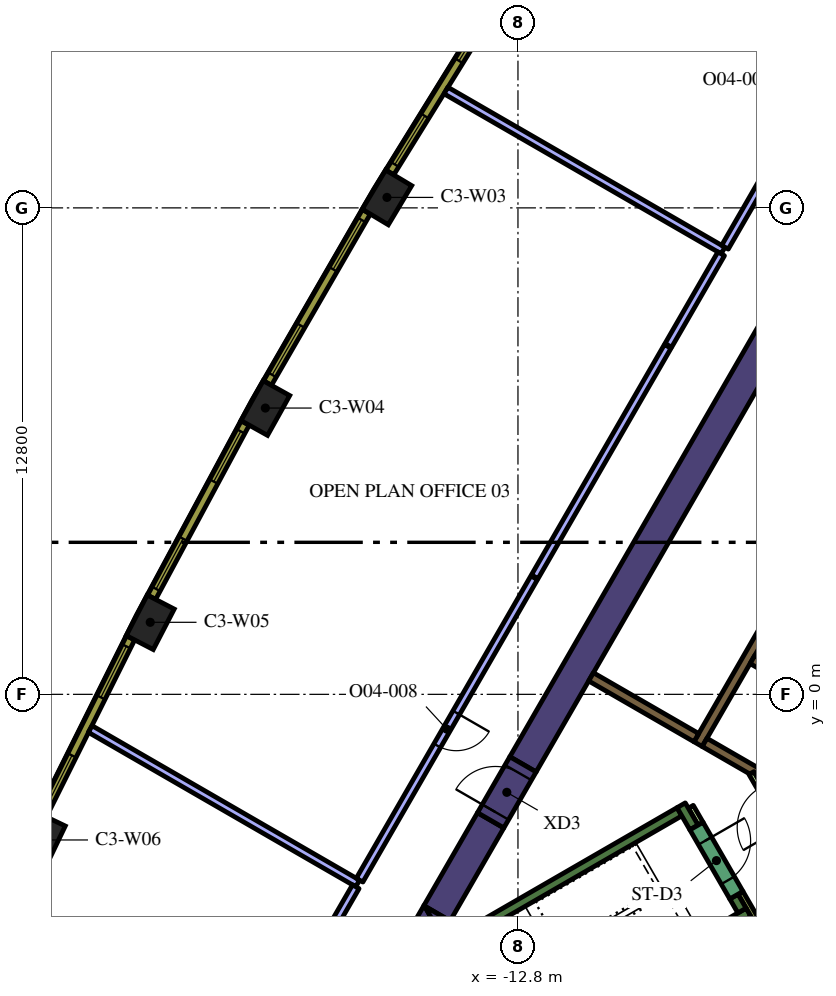
"""IFC4 building model, lengths in metres.
Left out: names, types, materials, properties, quantities, classifications, styles, units other than length and angle.
Written with IfcOpenShell. Run it as: python <this file> out.ifc"""

import sys

from ifc_helpers import new_model, si_unit, direction, frame, frame_2d, origin, origin_2d, place, context, subcontext, project, spatial, polyline, rectangle, outline, extrude, element, fill, save


model = new_model("IFC4")
c1 = context("Model", 3, precision=1e-05, world=origin(), true_north=direction((0.0, 1.0)))
c2 = subcontext(c1, "Body", "Model", "MODEL_VIEW")
j1 = project(units=[si_unit("LENGTHUNIT", "METRE"), si_unit("PLANEANGLEUNIT", "RADIAN")], contexts=[c1])
p1 = place(None, origin())
s1 = spatial("IfcSite", under=j1, at=p1, CompositionType="ELEMENT")
p2 = place(p1, origin())
s2 = spatial("IfcBuilding", under=s1, at=p2, CompositionType="ELEMENT")
p3 = place(p2, frame((0.0, 0.0, 183.6)))
s3 = spatial("IfcBuildingStorey", under=s2, at=p3, CompositionType="ELEMENT", Elevation=183.6)
for number, where, z_axis, x_axis in (
    (1, (-16.247, 13.075, 0.0), (0.0, 0.0, 1.0), (-0.513, -0.858, 0.0)),
    (2, (-19.447, 7.533, 0.0), (0.0, 0.0, 1.0), (-0.487, -0.874, 0.0)),
    (3, (-22.476, 1.896, 0.0), (0.0, 0.0, 1.0), (-0.46, -0.888, 0.0)),
    (4, (-25.332, -3.832, 0.0), (0.0, 0.0, 1.0), (-0.433, -0.902, 0.0)),
):
    element("IfcColumn", number, at=place(p3, frame(where, z_axis=z_axis, x_axis=x_axis)), inside=s3, PredefinedType="COLUMN", context=c2, shape_type="SweptSolid", body=[
        extrude(rectangle(XDim=1.2, YDim=0.8, at=origin_2d()), origin(), (0.0, 0.0, 1.0), 4.2),
    ])
p4 = place(p3, origin())
e5 = element("IfcWall", 5, at=p4, inside=s3, PredefinedType="SOLIDWALL", context=c2, shape_type="SweptSolid", body=[
    extrude(outline(polyline([(-15.047, -5.938), (-15.719, -6.326), (-15.271, -5.55), (-15.047, -5.938)])), origin(), (0.0, 0.0, 1.0), 4.2),
])
p5 = place(p3, frame((-13.518, -3.314, 0.0), z_axis=(0.0, 0.0, 1.0), x_axis=(-0.499969377405, -0.866043083026, 0.0)))
e6 = element("IfcWall", 6, at=p5, inside=s3, PredefinedType="SOLIDWALL", context=c2, shape_type="SweptSolid", body=[
    extrude(rectangle(XDim=2.824, YDim=0.8, at=frame_2d((1.412, 0.0))), origin(), (0.0, 0.0, 1.0), 4.2),
])
e7 = element("IfcWall", 7, at=p4, inside=s3, PredefinedType="SOLIDWALL", context=c2, shape_type="SweptSolid", body=[
    extrude(outline(polyline([(-14.809, -6.35), (-15.257, -5.574), (-14.585, -5.962), (-14.809, -6.35)])), origin(), (0.0, 0.0, 1.0), 4.2),
])
p6 = place(p3, frame((-12.668, -1.842, 0.0), z_axis=(0.0, 0.0, 1.0), x_axis=(0.500003640647, 0.866023301845, 0.0)))
e8 = element("IfcWall", 8, at=p6, inside=s3, PredefinedType="SOLIDWALL", context=c2, shape_type="SweptSolid", body=[
    extrude(rectangle(XDim=15.858, YDim=0.8, at=frame_2d((7.929, 0.0))), origin(), (0.0, 0.0, 1.0), 4.2),
])
p7 = place(p3, frame((-14.44, -6.49, 0.0), z_axis=(0.0, 0.0, 1.0), x_axis=(0.866022966069, 0.500004222222, 0.0)))
e9 = element("IfcWall", 9, at=p7, inside=s3, PredefinedType="SOLIDWALL", context=c2, shape_type="SweptSolid", body=[
    extrude(rectangle(XDim=6.8, YDim=0.25, at=frame_2d((3.4, 0.0))), origin(), (0.0, 0.0, 1.0), 4.2),
])
p8 = place(p3, frame((-8.168, -3.503, 0.0), z_axis=(0.0, 0.0, 1.0), x_axis=(-0.499952099219, 0.866053057547, 0.0)))
e10 = element("IfcWall", 10, at=p8, inside=s3, PredefinedType="SOLIDWALL", context=c2, shape_type="SweptSolid", body=[
    extrude(rectangle(XDim=0.675, YDim=0.25, at=frame_2d((0.337, 0.0))), origin(), (0.0, 0.0, 1.0), 4.2),
])
p9 = place(p3, frame((-12.84, -9.261, 0.0), z_axis=(0.0, 0.0, 1.0), x_axis=(0.866016039709, 0.500016218704, 0.0)))
e11 = element("IfcWall", 11, at=p9, inside=s3, PredefinedType="SOLIDWALL", context=c2, shape_type="SweptSolid", body=[
    extrude(rectangle(XDim=7.05, YDim=0.25, at=frame_2d((3.525, 0.0))), origin(), (0.0, 0.0, 1.0), 4.2),
])
p10 = place(p3, frame((-6.905, -5.69, 0.0), z_axis=(0.0, 0.0, 1.0), x_axis=(-0.500402024738, 0.865793170242, 0.0)))
e12 = element("IfcWall", 12, at=p10, inside=s3, PredefinedType="SOLIDWALL", context=c2, shape_type="SweptSolid", body=[
    extrude(rectangle(XDim=0.425, YDim=0.25, at=frame_2d((0.212, 0.0))), origin(), (0.0, 0.0, 1.0), 4.2),
])
p11 = place(p3, frame((-8.06, -1.311, 0.0), z_axis=(0.0, 0.0, 1.0), x_axis=(0.50000273126, 0.866023826885, 0.0)))
e13 = element("IfcWall", 13, at=p11, inside=s3, PredefinedType="SOLIDWALL", context=c2, shape_type="SweptSolid", body=[
    extrude(rectangle(XDim=10.33, YDim=0.25, at=frame_2d((5.165, 0.0))), origin(), (0.0, 0.0, 1.0), 4.2),
])
p12 = place(p3, frame((-4.724, -0.182, 0.0), z_axis=(0.0, 0.0, 1.0), x_axis=(-0.866008176907, 0.50002983664, 0.0)))
e14 = element("IfcWall", 14, at=p12, inside=s3, PredefinedType="SOLIDWALL", context=c2, shape_type="SweptSolid", body=[
    extrude(rectangle(XDim=2.2, YDim=0.25, at=frame_2d((1.1, 0.0))), origin(), (0.0, 0.0, 1.0), 4.2),
])
e15 = element("IfcWall", 15, at=p4, inside=s3, PredefinedType="SOLIDWALL", context=c2, shape_type="SweptSolid", body=[
    extrude(outline(polyline([(-5.922, -2.257), (-5.922, -2.257), (-5.705, -2.382), (-5.83, -2.598), (-6.483, -2.221), (-6.591, -2.033), (-6.591, -2.033), (-6.7, -2.096), (-7.952, -1.373), (-7.827, -1.156), (-5.922, -2.257)])), origin(), (0.0, 0.0, 1.0), 4.2),
])
p13 = place(p3, frame((-8.106, -1.14, 0.0), z_axis=(0.0, 0.0, 1.0), x_axis=(-0.866008981251, 0.500028443584, 0.0)))
e16 = element("IfcWall", 16, at=p13, inside=s3, PredefinedType="SOLIDWALL", context=c2, shape_type="SweptSolid", body=[
    extrude(rectangle(XDim=3.2, YDim=0.25, at=frame_2d((1.6, 0.0))), origin(), (0.0, 0.0, 1.0), 4.2),
])
p14 = place(p3, frame((-8.252, -2.958, 0.0), z_axis=(0.0, 0.0, 1.0), x_axis=(0.500174715838, -0.865924508047, 0.0)))
e17 = element("IfcWall", 17, at=p14, inside=s3, PredefinedType="PARTITIONING", context=c2, shape_type="SweptSolid", body=[
    extrude(rectangle(XDim=0.514, YDim=0.15, at=frame_2d((0.257, 0.0))), origin(), (0.0, 0.0, 1.0), 3.15),
])
p15 = place(p3, frame((-6.48, -6.027, 0.0), z_axis=(0.0, 0.0, 1.0), x_axis=(-0.499927229454, 0.866067413802, 0.0)))
e18 = element("IfcWall", 18, at=p15, inside=s3, PredefinedType="PARTITIONING", context=c2, shape_type="SweptSolid", body=[
    extrude(rectangle(XDim=0.929, YDim=0.15, at=frame_2d((0.464, 0.0))), origin(), (0.0, 0.0, 1.0), 4.2),
])
p16 = place(p3, frame((-8.103, -3.466, 0.0), z_axis=(0.0, 0.0, 1.0), x_axis=(0.500078061341, -0.865980330357, 0.0)))
e19 = element("IfcWall", 19, at=p16, inside=s3, PredefinedType="SOLIDWALL", context=c2, shape_type="SweptSolid", body=[
    extrude(rectangle(XDim=2.1, YDim=0.4, at=frame_2d((1.05, 0.0))), origin(), (0.0, 0.0, 1.0), 4.2),
])
p17 = place(p16, frame((0.45, 0.0, 0.0)))
e20 = element("IfcOpeningElement", 20, at=p17, cuts=e19, PredefinedType="OPENING", context=c2, shape_type="SweptSolid", body=[
    extrude(rectangle(XDim=1.2, YDim=2.1, at=frame_2d((0.6, 1.05))), frame((0.0, 0.21, 0.0), z_axis=(0.0, -1.0, 0.0), x_axis=(1.0, 0.0, 0.0)), (0.0, 0.0, 1.0), 0.42),
])
p18 = place(p3, frame((-5.606, -3.89, 0.0), z_axis=(0.0, 0.0, 1.0), x_axis=(-0.500027713859, 0.866009402589, 0.0)))
e21 = element("IfcWall", 21, at=p18, inside=s3, PredefinedType="PARTITIONING", context=c2, shape_type="SweptSolid", body=[
    extrude(rectangle(XDim=2.1, YDim=0.15, at=frame_2d((1.05, 0.0))), origin(), (0.0, 0.0, 1.0), 3.15),
])
p19 = place(p18, frame((0.45, 0.0, 0.0)))
e22 = element("IfcOpeningElement", 22, at=p19, cuts=e21, PredefinedType="OPENING", context=c2, shape_type="SweptSolid", body=[
    extrude(rectangle(XDim=1.2, YDim=2.1, at=frame_2d((0.6, 1.05))), frame((0.0, 0.085, 0.0), z_axis=(0.0, -1.0, 0.0), x_axis=(1.0, 0.0, 0.0)), (0.0, 0.0, 1.0), 0.17),
])
p20 = place(p3, frame((-13.518, -3.314, 0.0), z_axis=(0.0, 0.0, 1.0), x_axis=(0.500000056704, 0.866025371046, 0.0)))
e23 = element("IfcWall", 23, at=p20, inside=s3, PredefinedType="SOLIDWALL", context=c2, shape_type="SweptSolid", body=[
    extrude(rectangle(XDim=1.7, YDim=0.8, at=frame_2d((0.85, 0.0))), origin(), (0.0, 0.0, 1.0), 4.2),
])
p21 = place(p20, frame((0.25, 0.0, 0.0)))
e24 = element("IfcOpeningElement", 24, at=p21, cuts=e23, PredefinedType="OPENING", context=c2, shape_type="SweptSolid", body=[
    extrude(rectangle(XDim=1.2, YDim=2.1, at=frame_2d((0.6, 1.05))), frame((0.0, 0.41, 0.0), z_axis=(0.0, -1.0, 0.0), x_axis=(1.0, 0.0, 0.0)), (0.0, 0.0, 1.0), 0.82),
])
p22 = place(p3, frame((-7.403, 11.678, 0.0), z_axis=(0.0, 0.0, 1.0), x_axis=(-0.866029143232, 0.499993523031, 0.0)))
e25 = element("IfcWall", 25, at=p22, inside=s3, PredefinedType="PARTITIONING", context=c2, shape_type="SweptSolid", body=[
    extrude(rectangle(XDim=8.42, YDim=0.2, at=frame_2d((4.21, 0.0))), origin(), (0.0, 0.0, 1.0), 3.15),
])
p23 = place(p3, frame((-3.421, 18.574, 0.0), z_axis=(0.0, 0.0, 1.0), x_axis=(-0.499989434416, -0.866031503741, 0.0)))
e26 = element("IfcWall", 26, at=p23, inside=s3, PredefinedType="PARTITIONING", context=c2, shape_type="SweptSolid", body=[
    extrude(rectangle(XDim=7.863, YDim=0.2, at=frame_2d((3.932, 0.0))), origin(), (0.0, 0.0, 1.0), 3.15),
])
p24 = place(p23, frame((3.4, 0.0, 0.0)))
e27 = element("IfcOpeningElement", 27, at=p24, cuts=e26, PredefinedType="OPENING", context=c2, shape_type="SweptSolid", body=[
    extrude(rectangle(XDim=1.0, YDim=2.1, at=frame_2d((0.5, 1.05))), frame((0.0, 0.11, 0.0), z_axis=(0.0, -1.0, 0.0), x_axis=(1.0, 0.0, 0.0)), (0.0, 0.0, 1.0), 0.22),
])
p25 = place(p3, frame((-17.018, -4.976, 0.0), z_axis=(0.0, 0.0, 1.0), x_axis=(-0.866034495264, 0.499984252764, 0.0)))
e28 = element("IfcWall", 28, at=p25, inside=s3, PredefinedType="PARTITIONING", context=c2, shape_type="SweptSolid", body=[
    extrude(rectangle(XDim=8.126, YDim=0.2, at=frame_2d((4.063, 0.0))), origin(), (0.0, 0.0, 1.0), 3.15),
])
p26 = place(p3, frame((-8.859, 9.156, 0.0), z_axis=(0.0, 0.0, 1.0), x_axis=(-0.500010275428, -0.866019471182, 0.0)))
e29 = element("IfcWall", 29, at=p26, inside=s3, PredefinedType="PARTITIONING", context=c2, shape_type="SweptSolid", body=[
    extrude(rectangle(XDim=7.0, YDim=0.2, at=frame_2d((3.5, 0.0))), origin(), (0.0, 0.0, 1.0), 3.15),
])
p27 = place(p3, frame((-12.374, 3.068, 0.0), z_axis=(0.0, 0.0, 1.0), x_axis=(-0.50000000053, -0.866025403479, 0.0)))
e30 = element("IfcWall", 30, at=p27, inside=s3, PredefinedType="PARTITIONING", context=c2, shape_type="SweptSolid", body=[
    extrude(rectangle(XDim=9.188, YDim=0.2, at=frame_2d((4.594, 0.0))), origin(), (0.0, 0.0, 1.0), 3.15),
])
p28 = place(p27, frame((4.1, 0.0, 0.0)))
e31 = element("IfcOpeningElement", 31, at=p28, cuts=e30, PredefinedType="OPENING", context=c2, shape_type="SweptSolid", body=[
    extrude(rectangle(XDim=1.0, YDim=2.1, at=frame_2d((0.5, 1.05))), frame((0.0, 0.11, 0.0), z_axis=(0.0, -1.0, 0.0), x_axis=(1.0, 0.0, 0.0)), (0.0, 0.0, 1.0), 0.22),
])
p29 = place(p3, frame((-7.453, 11.591, 0.0), z_axis=(0.0, 0.0, 1.0), x_axis=(-0.499980749935, -0.866036517529, 0.0)))
e32 = element("IfcWall", 32, at=p29, inside=s3, PredefinedType="PARTITIONING", context=c2, shape_type="SweptSolid", body=[
    extrude(rectangle(XDim=2.782, YDim=0.2, at=frame_2d((1.391, 0.0))), origin(), (0.0, 0.0, 1.0), 3.15),
])
p30 = place(p3, frame((-17.068, -5.062, 0.0), z_axis=(0.0, 0.0, 1.0), x_axis=(-0.499935638681, -0.86606255962, 0.0)))
e33 = element("IfcWall", 33, at=p30, inside=s3, PredefinedType="PARTITIONING", context=c2, shape_type="SweptSolid", body=[
    extrude(rectangle(XDim=1.487, YDim=0.2, at=frame_2d((0.744, 0.0))), origin(), (0.0, 0.0, 1.0), 3.15),
])
p31 = place(p3, frame((-13.433, 18.156, 0.0), z_axis=(0.0, 0.0, 1.0), x_axis=(-0.526197926587, -0.850362124072, 0.0)))
e34 = element("IfcWall", 34, at=p31, inside=s3, PredefinedType="SOLIDWALL", context=c2, shape_type="SweptSolid", body=[
    extrude(rectangle(XDim=5.203, YDim=0.24, at=frame_2d((2.602, 0.0))), origin(), (0.0, 0.0, 1.0), 3.95),
])
p32 = place(p31, frame((0.248, 0.0, 0.9)))
e35 = element("IfcOpeningElement", 35, at=p32, cuts=e34, PredefinedType="OPENING", context=c2, shape_type="SweptSolid", body=[
    extrude(rectangle(XDim=1.5, YDim=2.55, at=frame_2d((0.75, 1.275))), frame((0.0, 0.13, 0.0), z_axis=(0.0, -1.0, 0.0), x_axis=(1.0, 0.0, 0.0)), (0.0, 0.0, 1.0), 0.26),
])
p33 = place(p31, frame((3.455, 0.0, 0.9)))
e36 = element("IfcOpeningElement", 36, at=p33, cuts=e34, PredefinedType="OPENING", context=c2, shape_type="SweptSolid", body=[
    extrude(rectangle(XDim=1.5, YDim=2.55, at=frame_2d((0.75, 1.275))), frame((0.0, 0.13, 0.0), z_axis=(0.0, -1.0, 0.0), x_axis=(1.0, 0.0, 0.0)), (0.0, 0.0, 1.0), 0.26),
])
p34 = place(p3, frame((-16.789, 12.697, 0.0), z_axis=(0.0, 0.0, 1.0), x_axis=(-0.500009456303, -0.866019944116, 0.0)))
e37 = element("IfcWall", 37, at=p34, inside=s3, PredefinedType="SOLIDWALL", context=c2, shape_type="SweptSolid", body=[
    extrude(rectangle(XDim=5.204, YDim=0.24, at=frame_2d((2.602, 0.0))), origin(), (0.0, 0.0, 1.0), 3.95),
])
p35 = place(p34, frame((0.248, 0.0, 0.9)))
e38 = element("IfcOpeningElement", 38, at=p35, cuts=e37, PredefinedType="OPENING", context=c2, shape_type="SweptSolid", body=[
    extrude(rectangle(XDim=1.5, YDim=2.55, at=frame_2d((0.75, 1.275))), frame((0.0, 0.13, 0.0), z_axis=(0.0, -1.0, 0.0), x_axis=(1.0, 0.0, 0.0)), (0.0, 0.0, 1.0), 0.26),
])
p36 = place(p34, frame((3.455, 0.0, 0.9)))
e39 = element("IfcOpeningElement", 39, at=p36, cuts=e37, PredefinedType="OPENING", context=c2, shape_type="SweptSolid", body=[
    extrude(rectangle(XDim=1.5, YDim=2.55, at=frame_2d((0.75, 1.275))), frame((0.0, 0.13, 0.0), z_axis=(0.0, -1.0, 0.0), x_axis=(1.0, 0.0, 0.0)), (0.0, 0.0, 1.0), 0.26),
])
p37 = place(p3, frame((-19.977, 7.139, 0.0), z_axis=(0.0, 0.0, 1.0), x_axis=(-0.473349833294, -0.880874528704, 0.0)))
e40 = element("IfcWall", 40, at=p37, inside=s3, PredefinedType="SOLIDWALL", context=c2, shape_type="SweptSolid", body=[
    extrude(rectangle(XDim=5.204, YDim=0.24, at=frame_2d((2.602, 0.0))), origin(), (0.0, 0.0, 1.0), 3.95),
])
p38 = place(p37, frame((0.248, 0.0, 0.9)))
e41 = element("IfcOpeningElement", 41, at=p38, cuts=e40, PredefinedType="OPENING", context=c2, shape_type="SweptSolid", body=[
    extrude(rectangle(XDim=1.5, YDim=2.55, at=frame_2d((0.75, 1.275))), frame((0.0, 0.13, 0.0), z_axis=(0.0, -1.0, 0.0), x_axis=(1.0, 0.0, 0.0)), (0.0, 0.0, 1.0), 0.26),
])
p39 = place(p37, frame((3.455, 0.0, 0.9)))
e42 = element("IfcOpeningElement", 42, at=p39, cuts=e40, PredefinedType="OPENING", context=c2, shape_type="SweptSolid", body=[
    extrude(rectangle(XDim=1.5, YDim=2.55, at=frame_2d((0.75, 1.275))), frame((0.0, 0.13, 0.0), z_axis=(0.0, -1.0, 0.0), x_axis=(1.0, 0.0, 0.0)), (0.0, 0.0, 1.0), 0.26),
])
p40 = place(p3, frame((-22.994, 1.485, 0.0), z_axis=(0.0, 0.0, 1.0), x_axis=(-0.446256171312, -0.8949052629, 0.0)))
e43 = element("IfcWall", 43, at=p40, inside=s3, PredefinedType="SOLIDWALL", context=c2, shape_type="SweptSolid", body=[
    extrude(rectangle(XDim=5.203, YDim=0.24, at=frame_2d((2.602, 0.0))), origin(), (0.0, 0.0, 1.0), 3.95),
])
p41 = place(p40, frame((0.248, 0.0, 0.9)))
e44 = element("IfcOpeningElement", 44, at=p41, cuts=e43, PredefinedType="OPENING", context=c2, shape_type="SweptSolid", body=[
    extrude(rectangle(XDim=1.5, YDim=2.55, at=frame_2d((0.75, 1.275))), frame((0.0, 0.13, 0.0), z_axis=(0.0, -1.0, 0.0), x_axis=(1.0, 0.0, 0.0)), (0.0, 0.0, 1.0), 0.26),
])
p42 = place(p40, frame((3.455, 0.0, 0.9)))
e45 = element("IfcOpeningElement", 45, at=p42, cuts=e43, PredefinedType="OPENING", context=c2, shape_type="SweptSolid", body=[
    extrude(rectangle(XDim=1.5, YDim=2.55, at=frame_2d((0.75, 1.275))), frame((0.0, 0.13, 0.0), z_axis=(0.0, -1.0, 0.0), x_axis=(1.0, 0.0, 0.0)), (0.0, 0.0, 1.0), 0.26),
])
p43 = place(p17, origin())
e46 = element("IfcDoor", 46, at=p43, inside=s3, OperationType="SINGLE_SWING_LEFT", PredefinedType="DOOR", context=c2, shape_type="SweptSolid", body=[
    extrude(rectangle(XDim=1.2, YDim=2.1, at=frame_2d((0.6, 1.05))), frame((0.0, 0.025, 0.0), z_axis=(0.0, -1.0, 0.0), x_axis=(1.0, 0.0, 0.0)), (0.0, 0.0, 1.0), 0.05),
])
fill(e20, e46)
p44 = place(p21, origin())
e47 = element("IfcDoor", 47, at=p44, inside=s3, OperationType="SINGLE_SWING_LEFT", PredefinedType="DOOR", context=c2, shape_type="SweptSolid", body=[
    extrude(rectangle(XDim=1.2, YDim=2.1, at=frame_2d((0.6, 1.05))), frame((0.0, 0.025, 0.0), z_axis=(0.0, -1.0, 0.0), x_axis=(1.0, 0.0, 0.0)), (0.0, 0.0, 1.0), 0.05),
])
fill(e24, e47)
p45 = place(p28, origin())
e48 = element("IfcDoor", 48, at=p45, inside=s3, OperationType="SINGLE_SWING_RIGHT", PredefinedType="DOOR", context=c2, shape_type="SweptSolid", body=[
    extrude(rectangle(XDim=1.0, YDim=2.1, at=frame_2d((0.5, 1.05))), frame((0.0, 0.025, 0.0), z_axis=(0.0, -1.0, 0.0), x_axis=(1.0, 0.0, 0.0)), (0.0, 0.0, 1.0), 0.05),
])
fill(e31, e48)
p46 = place(p32, origin())
e49 = element("IfcWindow", 49, at=p46, inside=s3, PartitioningType="SINGLE_PANEL", PredefinedType="WINDOW", context=c2, shape_type="SweptSolid", body=[
    extrude(rectangle(XDim=1.5, YDim=2.55, at=frame_2d((0.75, 1.275))), frame((0.0, 0.04, 0.0), z_axis=(0.0, -1.0, 0.0), x_axis=(1.0, 0.0, 0.0)), (0.0, 0.0, 1.0), 0.06),
])
fill(e35, e49)
p47 = place(p33, origin())
e50 = element("IfcWindow", 50, at=p47, inside=s3, PartitioningType="SINGLE_PANEL", PredefinedType="WINDOW", context=c2, shape_type="SweptSolid", body=[
    extrude(rectangle(XDim=1.5, YDim=2.55, at=frame_2d((0.75, 1.275))), frame((0.0, 0.04, 0.0), z_axis=(0.0, -1.0, 0.0), x_axis=(1.0, 0.0, 0.0)), (0.0, 0.0, 1.0), 0.06),
])
fill(e36, e50)
p48 = place(p35, origin())
e51 = element("IfcWindow", 51, at=p48, inside=s3, PartitioningType="SINGLE_PANEL", PredefinedType="WINDOW", context=c2, shape_type="SweptSolid", body=[
    extrude(rectangle(XDim=1.5, YDim=2.55, at=frame_2d((0.75, 1.275))), frame((0.0, 0.04, 0.0), z_axis=(0.0, -1.0, 0.0), x_axis=(1.0, 0.0, 0.0)), (0.0, 0.0, 1.0), 0.06),
])
fill(e38, e51)
p49 = place(p36, origin())
e52 = element("IfcWindow", 52, at=p49, inside=s3, PartitioningType="SINGLE_PANEL", PredefinedType="WINDOW", context=c2, shape_type="SweptSolid", body=[
    extrude(rectangle(XDim=1.5, YDim=2.55, at=frame_2d((0.75, 1.275))), frame((0.0, 0.04, 0.0), z_axis=(0.0, -1.0, 0.0), x_axis=(1.0, 0.0, 0.0)), (0.0, 0.0, 1.0), 0.06),
])
fill(e39, e52)
p50 = place(p38, origin())
e53 = element("IfcWindow", 53, at=p50, inside=s3, PartitioningType="SINGLE_PANEL", PredefinedType="WINDOW", context=c2, shape_type="SweptSolid", body=[
    extrude(rectangle(XDim=1.5, YDim=2.55, at=frame_2d((0.75, 1.275))), frame((0.0, 0.04, 0.0), z_axis=(0.0, -1.0, 0.0), x_axis=(1.0, 0.0, 0.0)), (0.0, 0.0, 1.0), 0.06),
])
fill(e41, e53)
p51 = place(p39, origin())
e54 = element("IfcWindow", 54, at=p51, inside=s3, PartitioningType="SINGLE_PANEL", PredefinedType="WINDOW", context=c2, shape_type="SweptSolid", body=[
    extrude(rectangle(XDim=1.5, YDim=2.55, at=frame_2d((0.75, 1.275))), frame((0.0, 0.04, 0.0), z_axis=(0.0, -1.0, 0.0), x_axis=(1.0, 0.0, 0.0)), (0.0, 0.0, 1.0), 0.06),
])
fill(e42, e54)
p52 = place(p41, origin())
e55 = element("IfcWindow", 55, at=p52, inside=s3, PartitioningType="SINGLE_PANEL", PredefinedType="WINDOW", context=c2, shape_type="SweptSolid", body=[
    extrude(rectangle(XDim=1.5, YDim=2.55, at=frame_2d((0.75, 1.275))), frame((0.0, 0.04, 0.0), z_axis=(0.0, -1.0, 0.0), x_axis=(1.0, 0.0, 0.0)), (0.0, 0.0, 1.0), 0.06),
])
fill(e44, e55)
p53 = place(p42, origin())
e56 = element("IfcWindow", 56, at=p53, inside=s3, PartitioningType="SINGLE_PANEL", PredefinedType="WINDOW", context=c2, shape_type="SweptSolid", body=[
    extrude(rectangle(XDim=1.5, YDim=2.55, at=frame_2d((0.75, 1.275))), frame((0.0, 0.04, 0.0), z_axis=(0.0, -1.0, 0.0), x_axis=(1.0, 0.0, 0.0)), (0.0, 0.0, 1.0), 0.06),
])
fill(e45, e56)
save(model, sys.argv[1])
